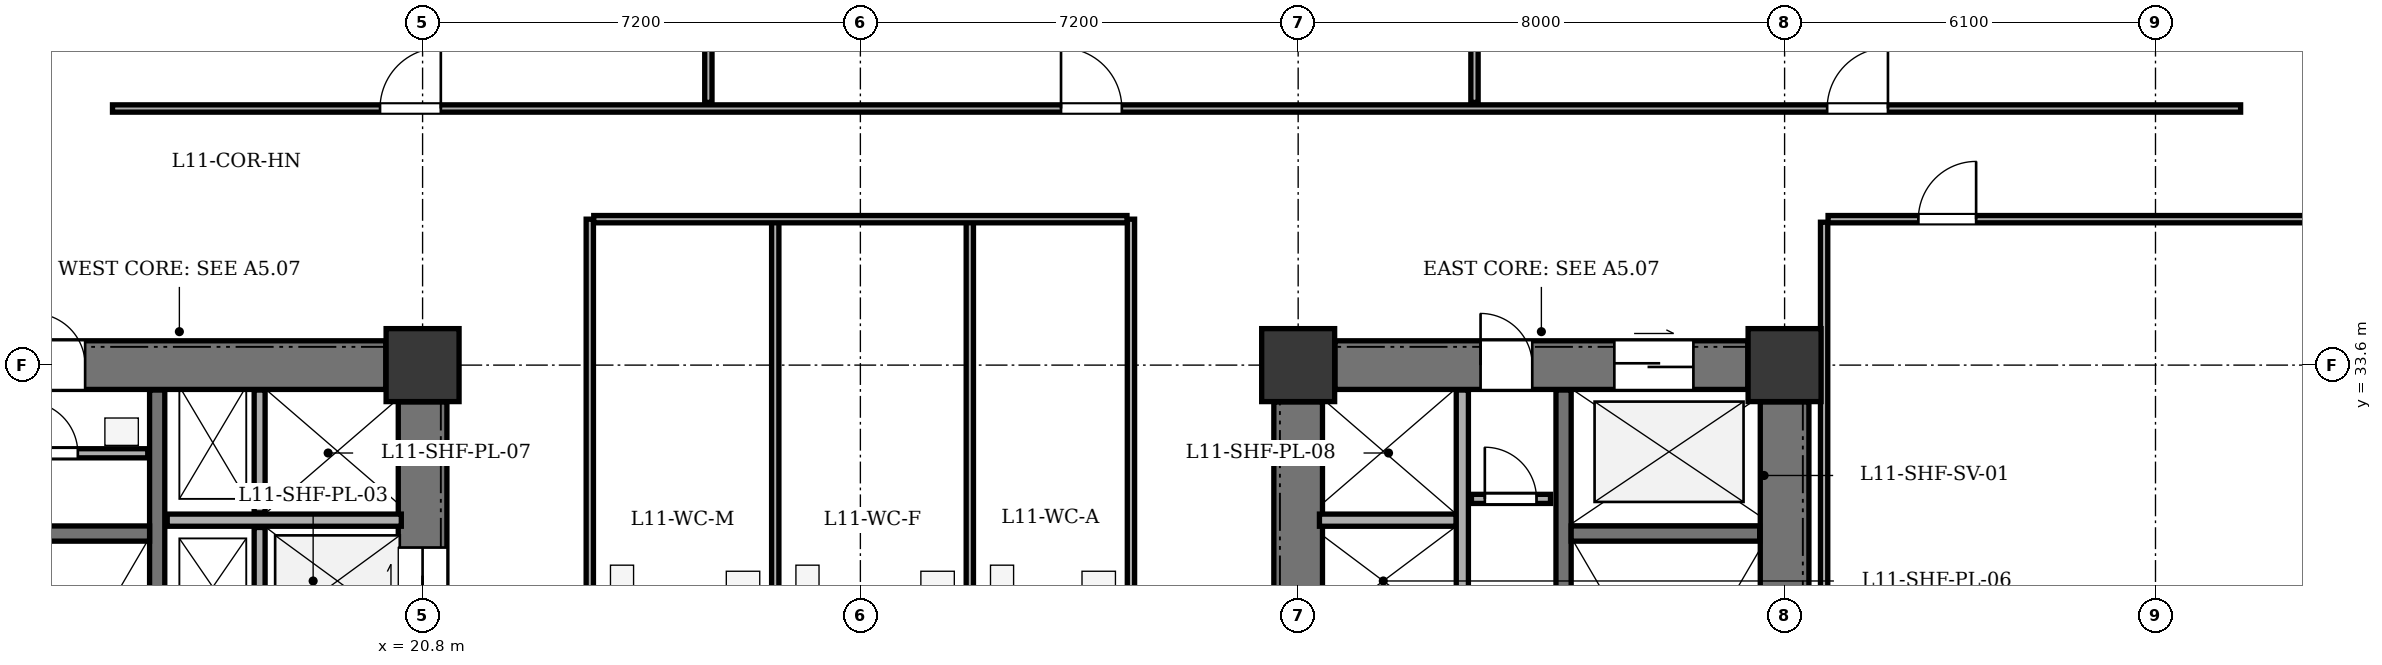
"""IFC4 building model, lengths in metres.
Left out: names, types, materials, properties, quantities, classifications, styles, units other than length and angle.
Written with IfcOpenShell. Run it as: python <this file> out.ifc"""

import sys

from ifc_helpers import new_model, si_unit, direction, frame, frame_2d, origin, origin_2d, place, context, subcontext, project, spatial, rectangle, extrude, element, fill, save


model = new_model("IFC4")
c1 = context("Model", 3, precision=1e-05, world=origin(), true_north=direction((0.0, 1.0)))
c2 = subcontext(c1, "Body", "Model", "MODEL_VIEW")
j1 = project(units=[si_unit("LENGTHUNIT", "METRE"), si_unit("PLANEANGLEUNIT", "RADIAN")], contexts=[c1])
p1 = place(None, origin())
s1 = spatial("IfcSite", under=j1, at=p1, CompositionType="ELEMENT")
p2 = place(p1, origin())
s2 = spatial("IfcBuilding", under=s1, at=p2, CompositionType="ELEMENT")
p3 = place(p2, frame((0.0, 0.0, 47.7)))
s3 = spatial("IfcBuildingStorey", under=s2, at=p3, CompositionType="ELEMENT", Elevation=47.7)
for number, where, z_axis, x_axis in (
    (1, (20.8, 33.6, 0.0), (0.0, 0.0, 1.0), (1.0, 0.0, 0.0)),
    (2, (35.2, 33.6, 0.0), (0.0, 0.0, 1.0), (1.0, 0.0, 0.0)),
    (3, (43.2, 33.6, 0.0), (0.0, 0.0, 1.0), (1.0, 0.0, 0.0)),
):
    element("IfcColumn", number, at=place(p3, frame(where, z_axis=z_axis, x_axis=x_axis)), inside=s3, PredefinedType="COLUMN", context=c2, shape_type="SweptSolid", body=[
        extrude(rectangle(XDim=1.2, YDim=1.2, at=origin_2d()), origin(), (0.0, 0.0, 1.0), 3.9),
    ])
p4 = place(p3, frame((13.405, 33.6, 0.0), z_axis=(0.0, 0.0, 1.0), x_axis=(1.0, 0.0, 0.0)))
e4 = element("IfcWall", 4, at=p4, inside=s3, PredefinedType="SHEAR", context=c2, shape_type="SweptSolid", body=[
    extrude(rectangle(XDim=6.79, YDim=0.8, at=frame_2d((3.395, 0.0))), origin(), (0.0, 0.0, 1.0), 3.6),
])
p5 = place(p4, frame((0.995, 0.0, 0.0)))
e5 = element("IfcOpeningElement", 5, at=p5, cuts=e4, PredefinedType="OPENING", context=c2, shape_type="SweptSolid", body=[
    extrude(rectangle(XDim=0.85, YDim=2.02, at=frame_2d((0.425, 1.01))), frame((0.0, 0.41, 0.0), z_axis=(0.0, -1.0, 0.0), x_axis=(1.0, 0.0, 0.0)), (0.0, 0.0, 1.0), 0.82),
])
p6 = place(p3, frame((20.8, 21.405, 0.0), z_axis=(0.0, 0.0, 1.0), x_axis=(0.0, 1.0, 0.0)))
e6 = element("IfcWall", 6, at=p6, inside=s3, PredefinedType="SHEAR", context=c2, shape_type="SweptSolid", body=[
    extrude(rectangle(XDim=11.59, YDim=0.8, at=frame_2d((5.795, 0.0))), origin(), (0.0, 0.0, 1.0), 3.6),
])
p7 = place(p6, frame((1.195, 0.0, 0.0)))
e7 = element("IfcOpeningElement", 7, at=p7, cuts=e6, PredefinedType="OPENING", context=c2, shape_type="SweptSolid", body=[
    extrude(rectangle(XDim=1.2, YDim=2.15, at=frame_2d((0.6, 1.075))), frame((0.0, 0.41, 0.0), z_axis=(0.0, -1.0, 0.0), x_axis=(1.0, 0.0, 0.0)), (0.0, 0.0, 1.0), 0.82),
])
p8 = place(p6, frame((4.195, 0.0, 0.0)))
e8 = element("IfcOpeningElement", 8, at=p8, cuts=e6, PredefinedType="OPENING", context=c2, shape_type="SweptSolid", body=[
    extrude(rectangle(XDim=1.1, YDim=2.1, at=frame_2d((0.55, 1.05))), frame((0.0, 0.41, 0.0), z_axis=(0.0, -1.0, 0.0), x_axis=(1.0, 0.0, 0.0)), (0.0, 0.0, 1.0), 0.82),
])
p9 = place(p6, frame((6.145, 0.0, 0.0)))
e9 = element("IfcOpeningElement", 9, at=p9, cuts=e6, PredefinedType="OPENING", context=c2, shape_type="SweptSolid", body=[
    extrude(rectangle(XDim=1.1, YDim=2.1, at=frame_2d((0.55, 1.05))), frame((0.0, 0.41, 0.0), z_axis=(0.0, -1.0, 0.0), x_axis=(1.0, 0.0, 0.0)), (0.0, 0.0, 1.0), 0.82),
])
p10 = place(p6, frame((8.095, 0.0, 0.0)))
e10 = element("IfcOpeningElement", 10, at=p10, cuts=e6, PredefinedType="OPENING", context=c2, shape_type="SweptSolid", body=[
    extrude(rectangle(XDim=1.1, YDim=2.1, at=frame_2d((0.55, 1.05))), frame((0.0, 0.41, 0.0), z_axis=(0.0, -1.0, 0.0), x_axis=(1.0, 0.0, 0.0)), (0.0, 0.0, 1.0), 0.82),
])
p11 = place(p3, frame((16.435, 21.21, 0.0), z_axis=(0.0, 0.0, 1.0), x_axis=(0.0, 1.0, 0.0)))
e11 = element("IfcWall", 11, at=p11, inside=s3, PredefinedType="SHEAR", context=c2, shape_type="SweptSolid", body=[
    extrude(rectangle(XDim=11.98, YDim=0.25, at=frame_2d((5.99, 0.0))), origin(), (0.0, 0.0, 1.0), 3.6),
])
p12 = place(p11, frame((0.44, 0.0, 0.0)))
e12 = element("IfcOpeningElement", 12, at=p12, cuts=e11, PredefinedType="OPENING", context=c2, shape_type="SweptSolid", body=[
    extrude(rectangle(XDim=1.2, YDim=2.15, at=frame_2d((0.6, 1.075))), frame((0.0, 0.135, 0.0), z_axis=(0.0, -1.0, 0.0), x_axis=(1.0, 0.0, 0.0)), (0.0, 0.0, 1.0), 0.27),
])
p13 = place(p11, frame((2.59, 0.0, 0.0)))
e13 = element("IfcOpeningElement", 13, at=p13, cuts=e11, PredefinedType="OPENING", context=c2, shape_type="SweptSolid", body=[
    extrude(rectangle(XDim=1.15, YDim=2.15, at=frame_2d((0.575, 1.075))), frame((0.0, 0.135, 0.0), z_axis=(0.0, -1.0, 0.0), x_axis=(1.0, 0.0, 0.0)), (0.0, 0.0, 1.0), 0.27),
])
p14 = place(p3, frame((13.21, 30.83, 0.0), z_axis=(0.0, 0.0, 1.0), x_axis=(1.0, 0.0, 0.0)))
e14 = element("IfcWall", 14, at=p14, inside=s3, PredefinedType="SHEAR", context=c2, shape_type="SweptSolid", body=[
    extrude(rectangle(XDim=3.1, YDim=0.25, at=frame_2d((1.55, 0.0))), origin(), (0.0, 0.0, 1.0), 3.6),
])
p15 = place(p3, frame((16.6, 31.05, 0.0), z_axis=(0.0, 0.0, 1.0), x_axis=(1.0, 0.0, 0.0)))
e15 = element("IfcWall", 15, at=p15, inside=s3, PredefinedType="SOLIDWALL", context=c2, shape_type="SweptSolid", body=[
    extrude(rectangle(XDim=3.85, YDim=0.2, at=frame_2d((1.925, 0.0))), origin(), (0.0, 0.0, 1.0), 3.6),
])
p16 = place(p3, frame((18.12, 25.27, 0.0), z_axis=(0.0, 0.0, 1.0), x_axis=(0.0, 1.0, 0.0)))
e16 = element("IfcWall", 16, at=p16, inside=s3, PredefinedType="PARTITIONING", context=c2, shape_type="SweptSolid", body=[
    extrude(rectangle(XDim=5.66, YDim=0.18, at=frame_2d((2.83, 0.0))), origin(), (0.0, 0.0, 1.0), 3.6),
])
p17 = place(p3, frame((18.12, 31.17, 0.0), z_axis=(0.0, 0.0, 1.0), x_axis=(0.0, 1.0, 0.0)))
e17 = element("IfcWall", 17, at=p17, inside=s3, PredefinedType="PARTITIONING", context=c2, shape_type="SweptSolid", body=[
    extrude(rectangle(XDim=2.02, YDim=0.18, at=frame_2d((1.01, 0.0))), origin(), (0.0, 0.0, 1.0), 3.6),
])
p18 = place(p3, frame((43.2, 21.405, 0.0), z_axis=(0.0, 0.0, 1.0), x_axis=(0.0, 1.0, 0.0)))
e18 = element("IfcWall", 18, at=p18, inside=s3, PredefinedType="SHEAR", context=c2, shape_type="SweptSolid", body=[
    extrude(rectangle(XDim=11.59, YDim=0.8, at=frame_2d((5.795, 0.0))), origin(), (0.0, 0.0, 1.0), 3.6),
])
p19 = place(p3, frame((35.805, 33.6, 0.0), z_axis=(0.0, 0.0, 1.0), x_axis=(1.0, 0.0, 0.0)))
e19 = element("IfcWall", 19, at=p19, inside=s3, PredefinedType="SHEAR", context=c2, shape_type="SweptSolid", body=[
    extrude(rectangle(XDim=6.79, YDim=0.8, at=frame_2d((3.395, 0.0))), origin(), (0.0, 0.0, 1.0), 3.6),
])
p20 = place(p19, frame((4.595, 0.0, 0.0)))
e20 = element("IfcOpeningElement", 20, at=p20, cuts=e19, PredefinedType="OPENING", context=c2, shape_type="SweptSolid", body=[
    extrude(rectangle(XDim=1.3, YDim=2.15, at=frame_2d((0.65, 1.075))), frame((0.0, 0.41, 0.0), z_axis=(0.0, -1.0, 0.0), x_axis=(1.0, 0.0, 0.0)), (0.0, 0.0, 1.0), 0.82),
])
p21 = place(p19, frame((2.395, 0.0, 0.0)))
e21 = element("IfcOpeningElement", 21, at=p21, cuts=e19, PredefinedType="OPENING", context=c2, shape_type="SweptSolid", body=[
    extrude(rectangle(XDim=0.85, YDim=2.02, at=frame_2d((0.425, 1.01))), frame((0.0, 0.41, 0.0), z_axis=(0.0, -1.0, 0.0), x_axis=(1.0, 0.0, 0.0)), (0.0, 0.0, 1.0), 0.82),
])
p22 = place(p3, frame((35.2, 21.405, 0.0), z_axis=(0.0, 0.0, 1.0), x_axis=(0.0, 1.0, 0.0)))
e22 = element("IfcWall", 22, at=p22, inside=s3, PredefinedType="SHEAR", context=c2, shape_type="SweptSolid", body=[
    extrude(rectangle(XDim=11.59, YDim=0.8, at=frame_2d((5.795, 0.0))), origin(), (0.0, 0.0, 1.0), 3.6),
])
p23 = place(p22, frame((1.195, 0.0, 0.0)))
e23 = element("IfcOpeningElement", 23, at=p23, cuts=e22, PredefinedType="OPENING", context=c2, shape_type="SweptSolid", body=[
    extrude(rectangle(XDim=1.2, YDim=2.15, at=frame_2d((0.6, 1.075))), frame((0.0, 0.41, 0.0), z_axis=(0.0, -1.0, 0.0), x_axis=(1.0, 0.0, 0.0)), (0.0, 0.0, 1.0), 0.82),
])
p24 = place(p3, frame((39.565, 21.21, 0.0), z_axis=(0.0, 0.0, 1.0), x_axis=(0.0, 1.0, 0.0)))
e24 = element("IfcWall", 24, at=p24, inside=s3, PredefinedType="SHEAR", context=c2, shape_type="SweptSolid", body=[
    extrude(rectangle(XDim=11.98, YDim=0.25, at=frame_2d((5.99, 0.0))), origin(), (0.0, 0.0, 1.0), 3.6),
])
p25 = place(p24, frame((0.44, 0.0, 0.0)))
e25 = element("IfcOpeningElement", 25, at=p25, cuts=e24, PredefinedType="OPENING", context=c2, shape_type="SweptSolid", body=[
    extrude(rectangle(XDim=1.2, YDim=2.15, at=frame_2d((0.6, 1.075))), frame((0.0, 0.135, 0.0), z_axis=(0.0, -1.0, 0.0), x_axis=(1.0, 0.0, 0.0)), (0.0, 0.0, 1.0), 0.27),
])
p26 = place(p24, frame((2.59, 0.0, 0.0)))
e26 = element("IfcOpeningElement", 26, at=p26, cuts=e24, PredefinedType="OPENING", context=c2, shape_type="SweptSolid", body=[
    extrude(rectangle(XDim=1.15, YDim=2.15, at=frame_2d((0.575, 1.075))), frame((0.0, 0.135, 0.0), z_axis=(0.0, -1.0, 0.0), x_axis=(1.0, 0.0, 0.0)), (0.0, 0.0, 1.0), 0.27),
])
p27 = place(p3, frame((39.69, 30.83, 0.0), z_axis=(0.0, 0.0, 1.0), x_axis=(1.0, 0.0, 0.0)))
e27 = element("IfcWall", 27, at=p27, inside=s3, PredefinedType="SHEAR", context=c2, shape_type="SweptSolid", body=[
    extrude(rectangle(XDim=3.1, YDim=0.25, at=frame_2d((1.55, 0.0))), origin(), (0.0, 0.0, 1.0), 3.6),
])
p28 = place(p3, frame((35.55, 31.05, 0.0), z_axis=(0.0, 0.0, 1.0), x_axis=(1.0, 0.0, 0.0)))
e28 = element("IfcWall", 28, at=p28, inside=s3, PredefinedType="SOLIDWALL", context=c2, shape_type="SweptSolid", body=[
    extrude(rectangle(XDim=2.25, YDim=0.2, at=frame_2d((1.125, 0.0))), origin(), (0.0, 0.0, 1.0), 3.6),
])
p29 = place(p3, frame((37.9, 25.27, 0.0), z_axis=(0.0, 0.0, 1.0), x_axis=(0.0, 1.0, 0.0)))
e29 = element("IfcWall", 29, at=p29, inside=s3, PredefinedType="SOLIDWALL", context=c2, shape_type="SweptSolid", body=[
    extrude(rectangle(XDim=7.92, YDim=0.2, at=frame_2d((3.96, 0.0))), origin(), (0.0, 0.0, 1.0), 3.6),
])
p30 = place(p3, frame((13.205, 32.15, 0.0), z_axis=(0.0, 0.0, 1.0), x_axis=(1.0, 0.0, 0.0)))
e30 = element("IfcWall", 30, at=p30, inside=s3, PredefinedType="PARTITIONING", context=c2, shape_type="SweptSolid", body=[
    extrude(rectangle(XDim=3.075, YDim=0.15, at=frame_2d((1.538, 0.0))), origin(), (0.0, 0.0, 1.0), 3.6),
])
p31 = place(p30, frame((1.075, 0.0, 0.0)))
e31 = element("IfcOpeningElement", 31, at=p31, cuts=e30, PredefinedType="OPENING", context=c2, shape_type="SweptSolid", body=[
    extrude(rectangle(XDim=0.85, YDim=2.02, at=frame_2d((0.425, 1.01))), frame((0.0, 0.085, 0.0), z_axis=(0.0, -1.0, 0.0), x_axis=(1.0, 0.0, 0.0)), (0.0, 0.0, 1.0), 0.17),
])
p32 = place(p3, frame((38.05, 31.4, 0.0), z_axis=(0.0, 0.0, 1.0), x_axis=(1.0, 0.0, 0.0)))
e32 = element("IfcWall", 32, at=p32, inside=s3, PredefinedType="PARTITIONING", context=c2, shape_type="SweptSolid", body=[
    extrude(rectangle(XDim=1.3, YDim=0.15, at=frame_2d((0.65, 0.0))), origin(), (0.0, 0.0, 1.0), 3.6),
])
p33 = place(p32, frame((0.22, 0.0, 0.0)))
e33 = element("IfcOpeningElement", 33, at=p33, cuts=e32, PredefinedType="OPENING", context=c2, shape_type="SweptSolid", body=[
    extrude(rectangle(XDim=0.85, YDim=2.02, at=frame_2d((0.425, 1.01))), frame((0.0, 0.085, 0.0), z_axis=(0.0, -1.0, 0.0), x_axis=(1.0, 0.0, 0.0)), (0.0, 0.0, 1.0), 0.17),
])
for number, where, z_axis, x_axis in (
    (34, (23.55, 24.715, 0.0), (0.0, 0.0, 1.0), (0.0, 1.0, 0.0)),
    (35, (32.45, 24.715, 0.0), (0.0, 0.0, 1.0), (0.0, 1.0, 0.0)),
    (36, (26.6, 24.715, 0.0), (0.0, 0.0, 1.0), (0.0, 1.0, 0.0)),
):
    element("IfcWall", number, at=place(p3, frame(where, z_axis=z_axis, x_axis=x_axis)), inside=s3, PredefinedType="PARTITIONING", context=c2, shape_type="SweptSolid", body=[
        extrude(rectangle(XDim=11.285, YDim=0.12, at=frame_2d((5.643, 0.0))), origin(), (0.0, 0.0, 1.0), 3.6),
    ])
p34 = place(p3, frame((29.8, 24.715, 0.0), z_axis=(0.0, 0.0, 1.0), x_axis=(0.0, 1.0, 0.0)))
e37 = element("IfcWall", 37, at=p34, inside=s3, PredefinedType="PARTITIONING", context=c2, shape_type="SweptSolid", body=[
    extrude(rectangle(XDim=11.285, YDim=0.12, at=frame_2d((5.643, 0.0))), origin(), (0.0, 0.0, 1.0), 3.135),
])
p35 = place(p3, frame((23.615, 36.0, 0.0), z_axis=(0.0, 0.0, 1.0), x_axis=(1.0, 0.0, 0.0)))
e38 = element("IfcWall", 38, at=p35, inside=s3, PredefinedType="PARTITIONING", context=c2, shape_type="SweptSolid", body=[
    extrude(rectangle(XDim=8.77, YDim=0.12, at=frame_2d((4.385, 0.0))), origin(), (0.0, 0.0, 1.0), 3.6),
])
p36 = place(p3, frame((15.7, 37.82, 0.0), z_axis=(0.0, 0.0, 1.0), x_axis=(1.0, 0.0, 0.0)))
e39 = element("IfcWall", 39, at=p36, inside=s3, PredefinedType="PARTITIONING", context=c2, shape_type="SweptSolid", body=[
    extrude(rectangle(XDim=35.0, YDim=0.12, at=frame_2d((17.5, 0.0))), origin(), (0.0, 0.0, 1.0), 3.6),
])
p37 = place(p36, frame((4.4, 0.0, 0.0)))
e40 = element("IfcOpeningElement", 40, at=p37, cuts=e39, PredefinedType="OPENING", context=c2, shape_type="SweptSolid", body=[
    extrude(rectangle(XDim=1.0, YDim=2.1, at=frame_2d((0.5, 1.05))), frame((0.0, 0.07, 0.0), z_axis=(0.0, -1.0, 0.0), x_axis=(1.0, 0.0, 0.0)), (0.0, 0.0, 1.0), 0.14),
])
p38 = place(p36, frame((15.6, 0.0, 0.0)))
e41 = element("IfcOpeningElement", 41, at=p38, cuts=e39, PredefinedType="OPENING", context=c2, shape_type="SweptSolid", body=[
    extrude(rectangle(XDim=1.0, YDim=2.1, at=frame_2d((0.5, 1.05))), frame((0.0, 0.07, 0.0), z_axis=(0.0, -1.0, 0.0), x_axis=(1.0, 0.0, 0.0)), (0.0, 0.0, 1.0), 0.14),
])
p39 = place(p36, frame((28.2, 0.0, 0.0)))
e42 = element("IfcOpeningElement", 42, at=p39, cuts=e39, PredefinedType="OPENING", context=c2, shape_type="SweptSolid", body=[
    extrude(rectangle(XDim=1.0, YDim=2.1, at=frame_2d((0.5, 1.05))), frame((0.0, 0.07, 0.0), z_axis=(0.0, -1.0, 0.0), x_axis=(1.0, 0.0, 0.0)), (0.0, 0.0, 1.0), 0.14),
])
for number, where, z_axis, x_axis in (
    (43, (25.5, 37.92, 0.0), (0.0, 0.0, 1.0), (0.0, 1.0, 0.0)),
    (44, (38.1, 37.92, 0.0), (0.0, 0.0, 1.0), (0.0, 1.0, 0.0)),
):
    element("IfcWall", number, at=place(p3, frame(where, z_axis=z_axis, x_axis=x_axis)), inside=s3, PredefinedType="PARTITIONING", context=c2, shape_type="SweptSolid", body=[
        extrude(rectangle(XDim=8.175, YDim=0.12, at=frame_2d((4.087, 0.0))), origin(), (0.0, 0.0, 1.0), 3.6),
    ])
p40 = place(p3, frame((43.85, 18.45, 0.0), z_axis=(0.0, 0.0, 1.0), x_axis=(0.0, 1.0, 0.0)))
e45 = element("IfcWall", 45, at=p40, inside=s3, PredefinedType="PARTITIONING", context=c2, shape_type="SweptSolid", body=[
    extrude(rectangle(XDim=17.5, YDim=0.12, at=frame_2d((8.75, 0.0))), origin(), (0.0, 0.0, 1.0), 3.6),
])
p41 = place(p3, frame((43.915, 36.0, 0.0), z_axis=(0.0, 0.0, 1.0), x_axis=(1.0, 0.0, 0.0)))
e46 = element("IfcWall", 46, at=p41, inside=s3, PredefinedType="PARTITIONING", context=c2, shape_type="SweptSolid", body=[
    extrude(rectangle(XDim=11.38, YDim=0.12, at=frame_2d((5.69, 0.0))), origin(), (0.0, 0.0, 1.0), 3.6),
])
p42 = place(p41, frame((1.485, 0.0, 0.0)))
e47 = element("IfcOpeningElement", 47, at=p42, cuts=e46, PredefinedType="OPENING", context=c2, shape_type="SweptSolid", body=[
    extrude(rectangle(XDim=0.95, YDim=2.1, at=frame_2d((0.475, 1.05))), frame((0.0, 0.07, 0.0), z_axis=(0.0, -1.0, 0.0), x_axis=(1.0, 0.0, 0.0)), (0.0, 0.0, 1.0), 0.14),
])
p43 = place(p5, origin())
e48 = element("IfcDoor", 48, at=p43, inside=s3, OperationType="SINGLE_SWING_LEFT", PredefinedType="DOOR", context=c2, shape_type="SweptSolid", body=[
    extrude(rectangle(XDim=0.85, YDim=2.02, at=frame_2d((0.425, 1.01))), frame((0.0, 0.025, 0.0), z_axis=(0.0, -1.0, 0.0), x_axis=(1.0, 0.0, 0.0)), (0.0, 0.0, 1.0), 0.05),
])
fill(e5, e48)
p44 = place(p10, origin())
e49 = element("IfcDoor", 49, at=p44, inside=s3, OperationType="DOUBLE_DOOR_SLIDING", PredefinedType="DOOR", context=c2, shape_type="SweptSolid", body=[
    extrude(rectangle(XDim=1.1, YDim=2.1, at=frame_2d((0.55, 1.05))), frame((0.0, 0.025, 0.0), z_axis=(0.0, -1.0, 0.0), x_axis=(1.0, 0.0, 0.0)), (0.0, 0.0, 1.0), 0.05),
])
fill(e10, e49)
p45 = place(p20, origin())
e50 = element("IfcDoor", 50, at=p45, inside=s3, OperationType="DOUBLE_DOOR_SLIDING", PredefinedType="DOOR", context=c2, shape_type="SweptSolid", body=[
    extrude(rectangle(XDim=1.3, YDim=2.15, at=frame_2d((0.65, 1.075))), frame((0.0, 0.025, 0.0), z_axis=(0.0, -1.0, 0.0), x_axis=(1.0, 0.0, 0.0)), (0.0, 0.0, 1.0), 0.05),
])
fill(e20, e50)
p46 = place(p21, origin())
e51 = element("IfcDoor", 51, at=p46, inside=s3, OperationType="SINGLE_SWING_LEFT", PredefinedType="DOOR", context=c2, shape_type="SweptSolid", body=[
    extrude(rectangle(XDim=0.85, YDim=2.02, at=frame_2d((0.425, 1.01))), frame((0.0, 0.025, 0.0), z_axis=(0.0, -1.0, 0.0), x_axis=(1.0, 0.0, 0.0)), (0.0, 0.0, 1.0), 0.05),
])
fill(e21, e51)
p47 = place(p31, origin())
e52 = element("IfcDoor", 52, at=p47, inside=s3, OperationType="SINGLE_SWING_LEFT", PredefinedType="DOOR", context=c2, shape_type="SweptSolid", body=[
    extrude(rectangle(XDim=0.85, YDim=2.02, at=frame_2d((0.425, 1.01))), frame((0.0, 0.025, 0.0), z_axis=(0.0, -1.0, 0.0), x_axis=(1.0, 0.0, 0.0)), (0.0, 0.0, 1.0), 0.05),
])
fill(e31, e52)
p48 = place(p33, origin())
e53 = element("IfcDoor", 53, at=p48, inside=s3, OperationType="SINGLE_SWING_LEFT", PredefinedType="DOOR", context=c2, shape_type="SweptSolid", body=[
    extrude(rectangle(XDim=0.85, YDim=2.02, at=frame_2d((0.425, 1.01))), frame((0.0, 0.025, 0.0), z_axis=(0.0, -1.0, 0.0), x_axis=(1.0, 0.0, 0.0)), (0.0, 0.0, 1.0), 0.05),
])
fill(e33, e53)
p49 = place(p37, origin())
e54 = element("IfcDoor", 54, at=p49, inside=s3, OperationType="SINGLE_SWING_RIGHT", PredefinedType="DOOR", context=c2, shape_type="SweptSolid", body=[
    extrude(rectangle(XDim=1.0, YDim=2.1, at=frame_2d((0.5, 1.05))), frame((0.0, 0.025, 0.0), z_axis=(0.0, -1.0, 0.0), x_axis=(1.0, 0.0, 0.0)), (0.0, 0.0, 1.0), 0.05),
])
fill(e40, e54)
p50 = place(p38, origin())
e55 = element("IfcDoor", 55, at=p50, inside=s3, OperationType="SINGLE_SWING_LEFT", PredefinedType="DOOR", context=c2, shape_type="SweptSolid", body=[
    extrude(rectangle(XDim=1.0, YDim=2.1, at=frame_2d((0.5, 1.05))), frame((0.0, 0.025, 0.0), z_axis=(0.0, -1.0, 0.0), x_axis=(1.0, 0.0, 0.0)), (0.0, 0.0, 1.0), 0.05),
])
fill(e41, e55)
p51 = place(p39, origin())
e56 = element("IfcDoor", 56, at=p51, inside=s3, OperationType="SINGLE_SWING_RIGHT", PredefinedType="DOOR", context=c2, shape_type="SweptSolid", body=[
    extrude(rectangle(XDim=1.0, YDim=2.1, at=frame_2d((0.5, 1.05))), frame((0.0, 0.025, 0.0), z_axis=(0.0, -1.0, 0.0), x_axis=(1.0, 0.0, 0.0)), (0.0, 0.0, 1.0), 0.05),
])
fill(e42, e56)
p52 = place(p42, origin())
e57 = element("IfcDoor", 57, at=p52, inside=s3, OperationType="SINGLE_SWING_RIGHT", PredefinedType="DOOR", context=c2, shape_type="SweptSolid", body=[
    extrude(rectangle(XDim=0.95, YDim=2.1, at=frame_2d((0.475, 1.05))), frame((0.0, 0.025, 0.0), z_axis=(0.0, -1.0, 0.0), x_axis=(1.0, 0.0, 0.0)), (0.0, 0.0, 1.0), 0.05),
])
fill(e47, e57)
save(model, sys.argv[1])
